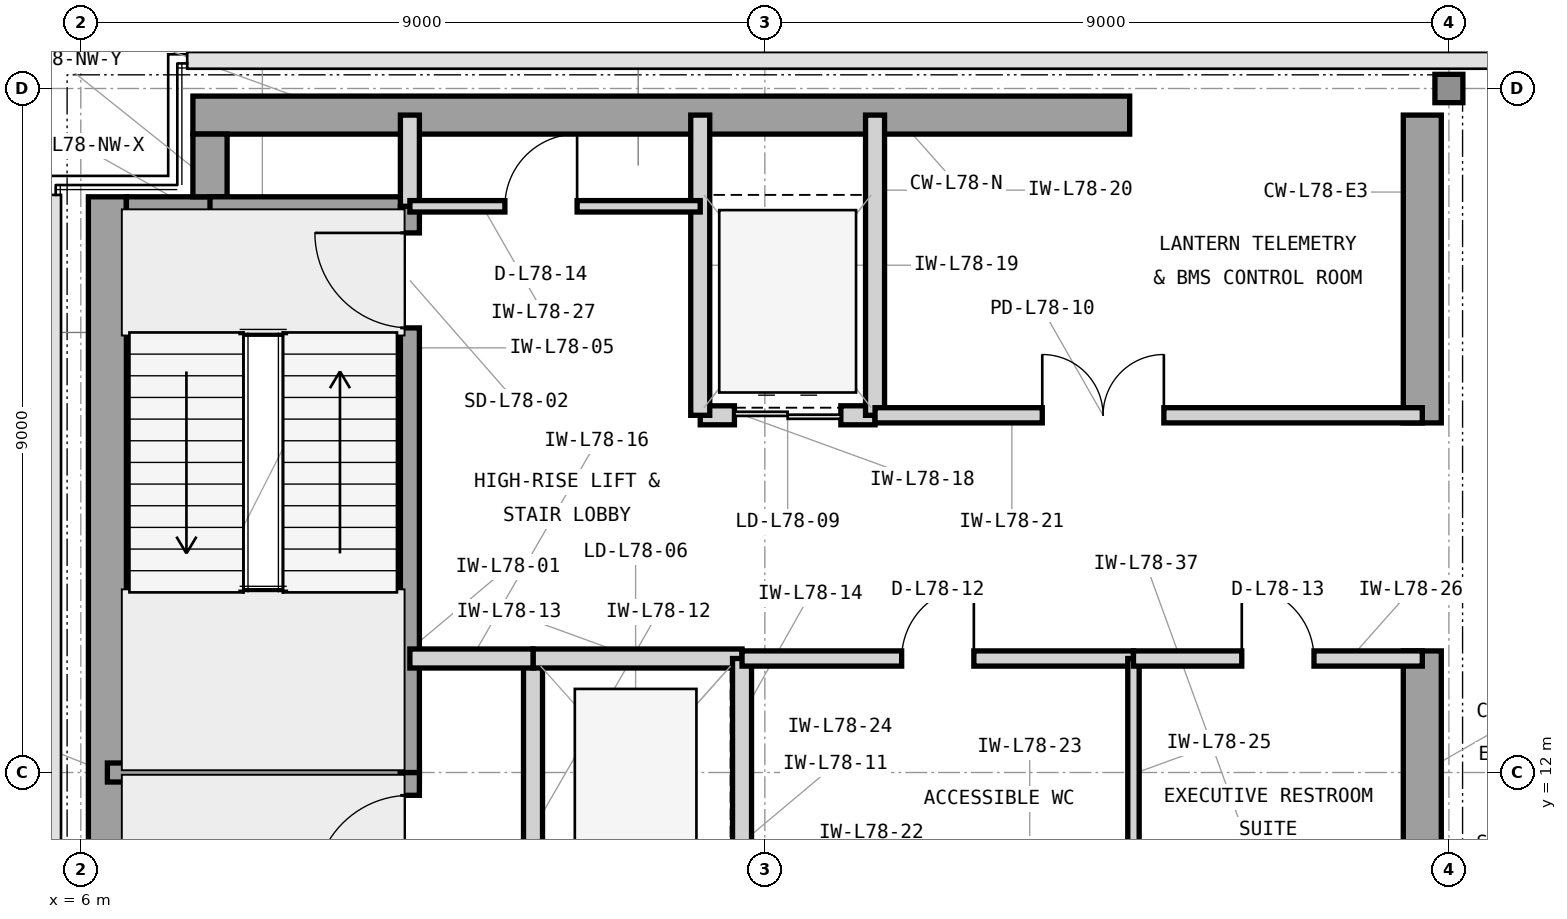
"""IFC4 building model, lengths in metres.
Left out: names, types, materials, properties, quantities, classifications, styles, units other than length and angle.
Written with IfcOpenShell. Run it as: python <this file> out.ifc"""

import sys

from ifc_helpers import new_model, si_unit, direction, frame, frame_2d, origin, origin_2d, place, context, subcontext, project, spatial, rectangle, i_section, extrude, element, fill, save


model = new_model("IFC4")
c1 = context("Model", 3, precision=1e-05, world=origin(), true_north=direction((0.0, 1.0)))
c2 = subcontext(c1, "Body", "Model", "MODEL_VIEW")
j1 = project(units=[si_unit("LENGTHUNIT", "METRE"), si_unit("PLANEANGLEUNIT", "RADIAN")], contexts=[c1])
p1 = place(None, origin())
s1 = spatial("IfcSite", under=j1, at=p1, CompositionType="ELEMENT")
p2 = place(p1, origin())
s2 = spatial("IfcBuilding", under=s1, at=p2, CompositionType="ELEMENT")
p3 = place(p2, frame((0.0, 0.0, 317.7)))
s3 = spatial("IfcBuildingStorey", under=s2, at=p3, CompositionType="ELEMENT", Elevation=317.7)
p4 = place(p3, frame((6.35, 4.425, 0.0), z_axis=(0.0, 0.0, 1.0), x_axis=(0.0, 1.0, 0.0)))
e1 = element("IfcWall", 1, at=p4, inside=s3, PredefinedType="SHEAR", context=c2, shape_type="SweptSolid", body=[
    extrude(rectangle(XDim=15.15, YDim=0.5, at=frame_2d((7.575, 0.0))), origin(), (0.0, 0.0, 1.0), 4.5),
])
p5 = place(p3, frame((7.475, 20.65, 0.0), z_axis=(0.0, 0.0, 1.0), x_axis=(1.0, 0.0, 0.0)))
e2 = element("IfcWall", 2, at=p5, inside=s3, PredefinedType="SHEAR", context=c2, shape_type="SweptSolid", body=[
    extrude(rectangle(XDim=12.325, YDim=0.5, at=frame_2d((6.163, 0.0))), origin(), (0.0, 0.0, 1.0), 4.5),
])
p6 = place(p3, frame((23.65, 10.4, 0.0), z_axis=(0.0, 0.0, 1.0), x_axis=(0.0, 1.0, 0.0)))
e3 = element("IfcWall", 3, at=p6, inside=s3, PredefinedType="SHEAR", context=c2, shape_type="SweptSolid", body=[
    extrude(rectangle(XDim=3.2, YDim=0.5, at=frame_2d((1.6, 0.0))), origin(), (0.0, 0.0, 1.0), 4.5),
])
p7 = place(p3, frame((23.65, 16.6, 0.0), z_axis=(0.0, 0.0, 1.0), x_axis=(0.0, 1.0, 0.0)))
e4 = element("IfcWall", 4, at=p7, inside=s3, PredefinedType="SHEAR", context=c2, shape_type="SweptSolid", body=[
    extrude(rectangle(XDim=4.05, YDim=0.5, at=frame_2d((2.025, 0.0))), origin(), (0.0, 0.0, 1.0), 4.5),
])
p8 = place(p3, frame((6.6, 19.35, 0.0), z_axis=(0.0, 0.0, 1.0), x_axis=(1.0, 0.0, 0.0)))
e5 = element("IfcWall", 5, at=p8, inside=s3, PredefinedType="SHEAR", context=c2, shape_type="SweptSolid", body=[
    extrude(rectangle(XDim=1.325, YDim=0.45, at=frame_2d((0.663, 0.0))), origin(), (0.0, 0.0, 1.0), 4.5),
])
p9 = place(p3, frame((7.7, 19.575, 0.0), z_axis=(0.0, 0.0, 1.0), x_axis=(0.0, 1.0, 0.0)))
e6 = element("IfcWall", 6, at=p9, inside=s3, PredefinedType="SHEAR", context=c2, shape_type="SweptSolid", body=[
    extrude(rectangle(XDim=0.825, YDim=0.45, at=frame_2d((0.413, 0.0))), origin(), (0.0, 0.0, 1.0), 4.5),
])
p10 = place(p3, frame((24.0, 21.0, 0.0), z_axis=(0.0, 0.0, 1.0), x_axis=(1.0, 0.0, 0.0)))
e7 = element("IfcColumn", 7, at=p10, inside=s3, PredefinedType="COLUMN", context=c2, shape_type="SweptSolid", body=[
    extrude(i_section(OverallWidth=0.373, OverallDepth=0.368, WebThickness=0.015, FlangeThickness=0.024, FilletRadius=0.019, at=origin_2d()), origin(), (0.0, 0.0, 1.0), 4.5),
])
p11 = place(p3, frame((6.35, 12.0, 0.0), z_axis=(0.0, 0.0, 1.0), x_axis=(1.0, 0.0, 0.0)))
e8 = element("IfcWall", 8, at=p11, inside=s3, PredefinedType="SHEAR", context=c2, shape_type="SweptSolid", body=[
    extrude(rectangle(XDim=4.105, YDim=0.25, at=frame_2d((2.052, 0.0))), origin(), (0.0, 0.0, 1.0), 4.5),
])
p12 = place(p3, frame((7.7, 19.45, 0.0), z_axis=(0.0, 0.0, 1.0), x_axis=(1.0, 0.0, 0.0)))
e9 = element("IfcWall", 9, at=p12, inside=s3, PredefinedType="SHEAR", context=c2, shape_type="SweptSolid", body=[
    extrude(rectangle(XDim=2.755, YDim=0.25, at=frame_2d((1.377, 0.0))), origin(), (0.0, 0.0, 1.0), 4.5),
])
p13 = place(p3, frame((10.33, 4.55, 0.0), z_axis=(0.0, 0.0, 1.0), x_axis=(0.0, 1.0, 0.0)))
e10 = element("IfcWall", 10, at=p13, inside=s3, PredefinedType="SHEAR", context=c2, shape_type="SweptSolid", body=[
    extrude(rectangle(XDim=7.45, YDim=0.25, at=frame_2d((3.725, 0.0))), origin(), (0.0, 0.0, 1.0), 4.5),
])
p14 = place(p13, frame((5.9, 0.0, 0.0)))
e11 = element("IfcOpeningElement", 11, at=p14, cuts=e10, PredefinedType="OPENING", context=c2, shape_type="SweptSolid", body=[
    extrude(rectangle(XDim=1.25, YDim=2.2, at=frame_2d((0.625, 1.1))), frame((0.0, 0.135, 0.0), z_axis=(0.0, -1.0, 0.0), x_axis=(1.0, 0.0, 0.0)), (0.0, 0.0, 1.0), 0.27),
])
p15 = place(p3, frame((10.33, 12.0, 0.0), z_axis=(0.0, 0.0, 1.0), x_axis=(0.0, 1.0, 0.0)))
e12 = element("IfcWall", 12, at=p15, inside=s3, PredefinedType="SHEAR", context=c2, shape_type="SweptSolid", body=[
    extrude(rectangle(XDim=7.45, YDim=0.25, at=frame_2d((3.725, 0.0))), origin(), (0.0, 0.0, 1.0), 4.5),
])
p16 = place(p15, frame((5.85, 0.0, 0.0)))
e13 = element("IfcOpeningElement", 13, at=p16, cuts=e12, PredefinedType="OPENING", context=c2, shape_type="SweptSolid", body=[
    extrude(rectangle(XDim=1.25, YDim=2.2, at=frame_2d((0.625, 1.1))), frame((0.0, 0.135, 0.0), z_axis=(0.0, -1.0, 0.0), x_axis=(1.0, 0.0, 0.0)), (0.0, 0.0, 1.0), 0.27),
])
p17 = place(p3, frame((10.33, 19.45, 0.0), z_axis=(0.0, 0.0, 1.0), x_axis=(0.0, 1.0, 0.0)))
e14 = element("IfcWall", 14, at=p17, inside=s3, PredefinedType="PARTITIONING", context=c2, shape_type="SweptSolid", body=[
    extrude(rectangle(XDim=1.2, YDim=0.25, at=frame_2d((0.6, 0.0))), origin(), (0.0, 0.0, 1.0), 4.23),
])
p18 = place(p3, frame((11.95, 10.5, 0.0), z_axis=(0.0, 0.0, 1.0), x_axis=(0.0, 1.0, 0.0)))
e15 = element("IfcWall", 15, at=p18, inside=s3, PredefinedType="PARTITIONING", context=c2, shape_type="SweptSolid", body=[
    extrude(rectangle(XDim=3.0, YDim=0.25, at=frame_2d((1.5, 0.0))), origin(), (0.0, 0.0, 1.0), 4.23),
])
p19 = place(p3, frame((11.95, 13.5, 0.0), z_axis=(0.0, 0.0, 1.0), x_axis=(1.0, 0.0, 0.0)))
e16 = element("IfcWall", 16, at=p19, inside=s3, PredefinedType="PARTITIONING", context=c2, shape_type="SweptSolid", body=[
    extrude(rectangle(XDim=2.75, YDim=0.25, at=frame_2d((1.375, 0.0))), origin(), (0.0, 0.0, 1.0), 3.92),
])
p20 = place(p3, frame((14.7, 10.5, 0.0), z_axis=(0.0, 0.0, 1.0), x_axis=(0.0, 1.0, 0.0)))
e17 = element("IfcWall", 17, at=p20, inside=s3, PredefinedType="PARTITIONING", context=c2, shape_type="SweptSolid", body=[
    extrude(rectangle(XDim=3.0, YDim=0.25, at=frame_2d((1.5, 0.0))), origin(), (0.0, 0.0, 1.0), 4.23),
])
p21 = place(p3, frame((10.33, 13.5, 0.0), z_axis=(0.0, 0.0, 1.0), x_axis=(1.0, 0.0, 0.0)))
e18 = element("IfcWall", 18, at=p21, inside=s3, PredefinedType="PARTITIONING", context=c2, shape_type="SweptSolid", body=[
    extrude(rectangle(XDim=1.62, YDim=0.25, at=frame_2d((0.81, 0.0))), origin(), (0.0, 0.0, 1.0), 3.92),
])
p22 = place(p3, frame((14.15, 16.7, 0.0), z_axis=(0.0, 0.0, 1.0), x_axis=(1.0, 0.0, 0.0)))
e19 = element("IfcWall", 19, at=p22, inside=s3, PredefinedType="PARTITIONING", context=c2, shape_type="SweptSolid", body=[
    extrude(rectangle(XDim=2.3, YDim=0.25, at=frame_2d((1.15, 0.0))), origin(), (0.0, 0.0, 1.0), 3.92),
])
p23 = place(p22, frame((0.45, 0.0, 0.0)))
e20 = element("IfcOpeningElement", 20, at=p23, cuts=e19, PredefinedType="OPENING", context=c2, shape_type="SweptSolid", body=[
    extrude(rectangle(XDim=1.4, YDim=2.35, at=frame_2d((0.7, 1.175))), frame((0.0, 0.135, 0.0), z_axis=(0.0, -1.0, 0.0), x_axis=(1.0, 0.0, 0.0)), (0.0, 0.0, 1.0), 0.27),
])
for number, where, z_axis, x_axis in (
    (21, (14.15, 16.7, 0.0), (0.0, 0.0, 1.0), (0.0, 1.0, 0.0)),
    (22, (16.45, 16.7, 0.0), (0.0, 0.0, 1.0), (0.0, 1.0, 0.0)),
):
    element("IfcWall", number, at=place(p3, frame(where, z_axis=z_axis, x_axis=x_axis)), inside=s3, PredefinedType="PARTITIONING", context=c2, shape_type="SweptSolid", body=[
        extrude(rectangle(XDim=3.95, YDim=0.25, at=frame_2d((1.975, 0.0))), origin(), (0.0, 0.0, 1.0), 4.23),
    ])
p24 = place(p3, frame((16.45, 16.7, 0.0), z_axis=(0.0, 0.0, 1.0), x_axis=(1.0, 0.0, 0.0)))
e23 = element("IfcWall", 23, at=p24, inside=s3, PredefinedType="PARTITIONING", context=c2, shape_type="SweptSolid", body=[
    extrude(rectangle(XDim=7.2, YDim=0.2, at=frame_2d((3.6, 0.0))), origin(), (0.0, 0.0, 1.0), 3.92),
])
p25 = place(p24, frame((2.2, 0.0, 0.0)))
e24 = element("IfcOpeningElement", 24, at=p25, cuts=e23, PredefinedType="OPENING", context=c2, shape_type="SweptSolid", body=[
    extrude(rectangle(XDim=1.6, YDim=2.3, at=frame_2d((0.8, 1.15))), frame((0.0, 0.11, 0.0), z_axis=(0.0, -1.0, 0.0), x_axis=(1.0, 0.0, 0.0)), (0.0, 0.0, 1.0), 0.22),
])
p26 = place(p3, frame((14.7, 13.5, 0.0), z_axis=(0.0, 0.0, 1.0), x_axis=(1.0, 0.0, 0.0)))
e25 = element("IfcWall", 25, at=p26, inside=s3, PredefinedType="PARTITIONING", context=c2, shape_type="SweptSolid", body=[
    extrude(rectangle(XDim=5.15, YDim=0.2, at=frame_2d((2.575, 0.0))), origin(), (0.0, 0.0, 1.0), 3.92),
])
p27 = place(p26, frame((2.1, 0.0, 0.0)))
e26 = element("IfcOpeningElement", 26, at=p27, cuts=e25, PredefinedType="OPENING", context=c2, shape_type="SweptSolid", body=[
    extrude(rectangle(XDim=0.95, YDim=2.1, at=frame_2d((0.475, 1.05))), frame((0.0, 0.11, 0.0), z_axis=(0.0, -1.0, 0.0), x_axis=(1.0, 0.0, 0.0)), (0.0, 0.0, 1.0), 0.22),
])
p28 = place(p3, frame((19.85, 10.465, 0.0), z_axis=(0.0, 0.0, 1.0), x_axis=(0.0, 1.0, 0.0)))
e27 = element("IfcWall", 27, at=p28, inside=s3, PredefinedType="PARTITIONING", context=c2, shape_type="SweptSolid", body=[
    extrude(rectangle(XDim=3.035, YDim=0.15, at=frame_2d((1.518, 0.0))), origin(), (0.0, 0.0, 1.0), 4.23),
])
p29 = place(p3, frame((19.85, 13.5, 0.0), z_axis=(0.0, 0.0, 1.0), x_axis=(1.0, 0.0, 0.0)))
e28 = element("IfcWall", 28, at=p29, inside=s3, PredefinedType="PARTITIONING", context=c2, shape_type="SweptSolid", body=[
    extrude(rectangle(XDim=3.8, YDim=0.2, at=frame_2d((1.9, 0.0))), origin(), (0.0, 0.0, 1.0), 3.92),
])
p30 = place(p29, frame((1.425, 0.0, 0.0)))
e29 = element("IfcOpeningElement", 29, at=p30, cuts=e28, PredefinedType="OPENING", context=c2, shape_type="SweptSolid", body=[
    extrude(rectangle(XDim=0.95, YDim=2.1, at=frame_2d((0.475, 1.05))), frame((0.0, 0.11, 0.0), z_axis=(0.0, -1.0, 0.0), x_axis=(1.0, 0.0, 0.0)), (0.0, 0.0, 1.0), 0.22),
])
p31 = place(p3, frame((10.33, 19.45, 0.0), z_axis=(0.0, 0.0, 1.0), x_axis=(1.0, 0.0, 0.0)))
e30 = element("IfcWall", 30, at=p31, inside=s3, PredefinedType="PARTITIONING", context=c2, shape_type="SweptSolid", body=[
    extrude(rectangle(XDim=3.82, YDim=0.15, at=frame_2d((1.91, 0.0))), origin(), (0.0, 0.0, 1.0), 4.23),
])
p32 = place(p31, frame((1.25, 0.0, 0.0)))
e31 = element("IfcOpeningElement", 31, at=p32, cuts=e30, PredefinedType="OPENING", context=c2, shape_type="SweptSolid", body=[
    extrude(rectangle(XDim=0.95, YDim=2.1, at=frame_2d((0.475, 1.05))), frame((0.0, 0.085, 0.0), z_axis=(0.0, -1.0, 0.0), x_axis=(1.0, 0.0, 0.0)), (0.0, 0.0, 1.0), 0.17),
])
p33 = place(p14, origin())
e32 = element("IfcDoor", 32, at=p33, inside=s3, OperationType="SINGLE_SWING_LEFT", PredefinedType="DOOR", context=c2, shape_type="SweptSolid", body=[
    extrude(rectangle(XDim=1.25, YDim=2.2, at=frame_2d((0.625, 1.1))), frame((0.0, 0.025, 0.0), z_axis=(0.0, -1.0, 0.0), x_axis=(1.0, 0.0, 0.0)), (0.0, 0.0, 1.0), 0.05),
])
fill(e11, e32)
p34 = place(p16, origin())
e33 = element("IfcDoor", 33, at=p34, inside=s3, OperationType="SINGLE_SWING_RIGHT", PredefinedType="DOOR", context=c2, shape_type="SweptSolid", body=[
    extrude(rectangle(XDim=1.25, YDim=2.2, at=frame_2d((0.625, 1.1))), frame((0.0, 0.025, 0.0), z_axis=(0.0, -1.0, 0.0), x_axis=(1.0, 0.0, 0.0)), (0.0, 0.0, 1.0), 0.05),
])
fill(e13, e33)
p35 = place(p23, origin())
e34 = element("IfcDoor", 34, at=p35, inside=s3, OperationType="DOUBLE_DOOR_SLIDING", PredefinedType="DOOR", context=c2, shape_type="SweptSolid", body=[
    extrude(rectangle(XDim=1.4, YDim=2.35, at=frame_2d((0.7, 1.175))), frame((0.0, 0.025, 0.0), z_axis=(0.0, -1.0, 0.0), x_axis=(1.0, 0.0, 0.0)), (0.0, 0.0, 1.0), 0.05),
])
fill(e20, e34)
p36 = place(p25, origin())
e35 = element("IfcDoor", 35, at=p36, inside=s3, OperationType="DOUBLE_DOOR_SINGLE_SWING", PredefinedType="DOOR", context=c2, shape_type="SweptSolid", body=[
    extrude(rectangle(XDim=1.6, YDim=2.3, at=frame_2d((0.8, 1.15))), frame((0.0, 0.025, 0.0), z_axis=(0.0, -1.0, 0.0), x_axis=(1.0, 0.0, 0.0)), (0.0, 0.0, 1.0), 0.05),
])
fill(e24, e35)
p37 = place(p27, origin())
e36 = element("IfcDoor", 36, at=p37, inside=s3, OperationType="SINGLE_SWING_RIGHT", PredefinedType="DOOR", context=c2, shape_type="SweptSolid", body=[
    extrude(rectangle(XDim=0.95, YDim=2.1, at=frame_2d((0.475, 1.05))), frame((0.0, 0.025, 0.0), z_axis=(0.0, -1.0, 0.0), x_axis=(1.0, 0.0, 0.0)), (0.0, 0.0, 1.0), 0.05),
])
fill(e26, e36)
p38 = place(p30, origin())
e37 = element("IfcDoor", 37, at=p38, inside=s3, OperationType="SINGLE_SWING_LEFT", PredefinedType="DOOR", context=c2, shape_type="SweptSolid", body=[
    extrude(rectangle(XDim=0.95, YDim=2.1, at=frame_2d((0.475, 1.05))), frame((0.0, 0.025, 0.0), z_axis=(0.0, -1.0, 0.0), x_axis=(1.0, 0.0, 0.0)), (0.0, 0.0, 1.0), 0.05),
])
fill(e29, e37)
p39 = place(p32, origin())
e38 = element("IfcDoor", 38, at=p39, inside=s3, OperationType="SINGLE_SWING_RIGHT", PredefinedType="DOOR", context=c2, shape_type="SweptSolid", body=[
    extrude(rectangle(XDim=0.95, YDim=2.1, at=frame_2d((0.475, 1.05))), frame((0.0, 0.025, 0.0), z_axis=(0.0, -1.0, 0.0), x_axis=(1.0, 0.0, 0.0)), (0.0, 0.0, 1.0), 0.05),
])
fill(e31, e38)
save(model, sys.argv[1])
